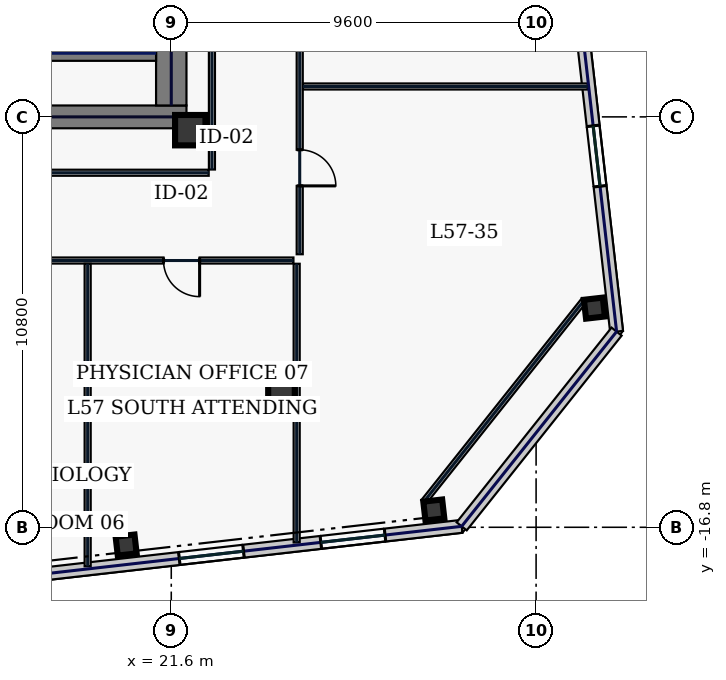
"""IFC4 building model, lengths in metres.
Left out: names, types, materials, properties, quantities, classifications, styles, units other than length and angle.
Written with IfcOpenShell. Run it as: python <this file> out.ifc"""

import sys

from ifc_helpers import new_model, si_unit, direction, frame, frame_2d, origin, origin_2d, place, context, subcontext, project, spatial, rectangle, hollow_rectangle, extrude, element, fill, save


model = new_model("IFC4")
c1 = context("Model", 3, precision=1e-05, world=origin(), true_north=direction((0.0, 1.0)))
c2 = subcontext(c1, "Body", "Model", "MODEL_VIEW")
j1 = project(units=[si_unit("LENGTHUNIT", "METRE"), si_unit("PLANEANGLEUNIT", "RADIAN")], contexts=[c1])
p1 = place(None, origin())
s1 = spatial("IfcSite", under=j1, at=p1, CompositionType="ELEMENT")
p2 = place(p1, origin())
s2 = spatial("IfcBuilding", under=s1, at=p2, CompositionType="ELEMENT")
p3 = place(p2, frame((0.0, 0.0, 247.0)))
s3 = spatial("IfcBuildingStorey", under=s2, at=p3, CompositionType="ELEMENT", Elevation=247.0)
p4 = place(p3, frame((10.5, -6.0, 0.0), z_axis=(0.0, 0.0, 1.0), x_axis=(1.0, 0.0, 0.0)))
e1 = element("IfcWall", 1, at=p4, inside=s3, PredefinedType="SHEAR", context=c2, shape_type="SweptSolid", body=[
    extrude(rectangle(XDim=11.5, YDim=0.6, at=frame_2d((5.75, 0.0))), origin(), (0.0, 0.0, 1.0), 3.74),
])
p5 = place(p3, frame((21.6, -5.7, 0.0), z_axis=(0.0, 0.0, 1.0), x_axis=(0.0, 1.0, 0.0)))
e2 = element("IfcWall", 2, at=p5, inside=s3, PredefinedType="SHEAR", context=c2, shape_type="SweptSolid", body=[
    extrude(rectangle(XDim=11.4, YDim=0.8, at=frame_2d((5.7, 0.0))), origin(), (0.0, 0.0, 1.0), 3.74),
])
p6 = place(p3, frame((17.8, -4.325, 0.0), z_axis=(0.0, 0.0, 1.0), x_axis=(1.0, 0.0, 0.0)))
e3 = element("IfcWall", 3, at=p6, inside=s3, PredefinedType="SHEAR", context=c2, shape_type="SweptSolid", body=[
    extrude(rectangle(XDim=3.4, YDim=0.4, at=frame_2d((1.7, 0.0))), origin(), (0.0, 0.0, 1.0), 3.74),
])
p7 = place(p3, frame((22.1, -6.35, 0.0), z_axis=(0.0, 0.0, 1.0), x_axis=(1.0, 0.0, 0.0)))
e4 = element("IfcColumn", 4, at=p7, inside=s3, PredefinedType="COLUMN", context=c2, shape_type="SweptSolid", body=[
    extrude(hollow_rectangle(XDim=0.8, YDim=0.8, WallThickness=0.036, at=origin_2d()), origin(), (0.0, 0.0, 1.0), 3.74),
])
p8 = place(p3, frame((24.5, -13.2, 0.0), z_axis=(0.0, 0.0, 1.0), x_axis=(1.0, 0.0, 0.0)))
e5 = element("IfcColumn", 5, at=p8, inside=s3, PredefinedType="COLUMN", context=c2, shape_type="SweptSolid", body=[
    extrude(hollow_rectangle(XDim=0.7, YDim=0.7, WallThickness=0.032, at=origin_2d()), origin(), (0.0, 0.0, 1.0), 3.74),
])
for number, where, z_axis, x_axis in (
    (6, (20.412, -17.268, 0.0), (0.0, 0.0, 1.0), (0.994, 0.113, 0.0)),
    (7, (28.509, -16.345, 0.0), (0.0, 0.0, 1.0), (0.994, 0.113, 0.0)),
    (8, (32.734, -11.033, 0.0), (0.0, 0.0, 1.0), (0.994, 0.113, 0.0)),
):
    element("IfcColumn", number, at=place(p3, frame(where, z_axis=z_axis, x_axis=x_axis)), inside=s3, PredefinedType="COLUMN", context=c2, shape_type="SweptSolid", body=[
        extrude(hollow_rectangle(XDim=0.5, YDim=0.5, WallThickness=0.025, at=origin_2d()), origin(), (0.0, 0.0, 1.0), 3.74),
    ])
p9 = place(p3, frame((10.71, -18.886, 0.0), z_axis=(0.0, 0.0, 1.0), x_axis=(0.993572271362, 0.113199565282, 0.0)))
e9 = element("IfcWall", 9, at=p9, inside=s3, PredefinedType="STANDARD", context=c2, shape_type="SweptSolid", body=[
    extrude(rectangle(XDim=18.651, YDim=0.34, at=frame_2d((9.326, 0.0))), origin(), (0.0, 0.0, 1.0), 3.74),
])
p10 = place(p9, frame((3.024, 0.0, 0.88)))
e10 = element("IfcOpeningElement", 10, at=p10, cuts=e9, PredefinedType="OPENING", context=c2, shape_type="SweptSolid", body=[
    extrude(rectangle(XDim=1.7, YDim=1.95, at=frame_2d((0.85, 0.975))), frame((0.0, 0.18, 0.0), z_axis=(0.0, -1.0, 0.0), x_axis=(1.0, 0.0, 0.0)), (0.0, 0.0, 1.0), 0.36),
])
p11 = place(p9, frame((6.773, 0.0, 0.88)))
e11 = element("IfcOpeningElement", 11, at=p11, cuts=e9, PredefinedType="OPENING", context=c2, shape_type="SweptSolid", body=[
    extrude(rectangle(XDim=0.85, YDim=1.85, at=frame_2d((0.425, 0.925))), frame((0.0, 0.18, 0.0), z_axis=(0.0, -1.0, 0.0), x_axis=(1.0, 0.0, 0.0)), (0.0, 0.0, 1.0), 0.36),
])
p12 = place(p9, frame((11.173, 0.0, 0.88)))
e12 = element("IfcOpeningElement", 12, at=p12, cuts=e9, PredefinedType="OPENING", context=c2, shape_type="SweptSolid", body=[
    extrude(rectangle(XDim=1.7, YDim=1.95, at=frame_2d((0.85, 0.975))), frame((0.0, 0.18, 0.0), z_axis=(0.0, -1.0, 0.0), x_axis=(1.0, 0.0, 0.0)), (0.0, 0.0, 1.0), 0.36),
])
p13 = place(p9, frame((14.921, 0.0, 0.88)))
e13 = element("IfcOpeningElement", 13, at=p13, cuts=e9, PredefinedType="OPENING", context=c2, shape_type="SweptSolid", body=[
    extrude(rectangle(XDim=1.7, YDim=1.95, at=frame_2d((0.85, 0.975))), frame((0.0, 0.18, 0.0), z_axis=(0.0, -1.0, 0.0), x_axis=(1.0, 0.0, 0.0)), (0.0, 0.0, 1.0), 0.36),
])
p14 = place(p3, frame((33.318, -11.651, 0.0), z_axis=(0.0, 0.0, 1.0), x_axis=(-0.11320360501, 0.9935718111, 0.0)))
e14 = element("IfcWall", 14, at=p14, inside=s3, PredefinedType="STANDARD", context=c2, shape_type="SweptSolid", body=[
    extrude(rectangle(XDim=37.2, YDim=0.34, at=frame_2d((18.6, 0.0))), origin(), (0.0, 0.0, 1.0), 3.74),
])
p15 = place(p14, frame((3.85, 0.0, 0.58)))
e15 = element("IfcOpeningElement", 15, at=p15, cuts=e14, PredefinedType="OPENING", context=c2, shape_type="SweptSolid", body=[
    extrude(rectangle(XDim=1.6, YDim=2.3, at=frame_2d((0.8, 1.15))), frame((0.0, 0.18, 0.0), z_axis=(0.0, -1.0, 0.0), x_axis=(1.0, 0.0, 0.0)), (0.0, 0.0, 1.0), 0.36),
])
p16 = place(p14, frame((13.15, 0.0, 0.58)))
e16 = element("IfcOpeningElement", 16, at=p16, cuts=e14, PredefinedType="OPENING", context=c2, shape_type="SweptSolid", body=[
    extrude(rectangle(XDim=1.6, YDim=2.3, at=frame_2d((0.8, 1.15))), frame((0.0, 0.18, 0.0), z_axis=(0.0, -1.0, 0.0), x_axis=(1.0, 0.0, 0.0)), (0.0, 0.0, 1.0), 0.36),
])
p17 = place(p14, frame((22.45, 0.0, 0.58)))
e17 = element("IfcOpeningElement", 17, at=p17, cuts=e14, PredefinedType="OPENING", context=c2, shape_type="SweptSolid", body=[
    extrude(rectangle(XDim=1.6, YDim=2.3, at=frame_2d((0.8, 1.15))), frame((0.0, 0.18, 0.0), z_axis=(0.0, -1.0, 0.0), x_axis=(1.0, 0.0, 0.0)), (0.0, 0.0, 1.0), 0.36),
])
p18 = place(p14, frame((31.75, 0.0, 0.58)))
e18 = element("IfcOpeningElement", 18, at=p18, cuts=e14, PredefinedType="OPENING", context=c2, shape_type="SweptSolid", body=[
    extrude(rectangle(XDim=1.6, YDim=2.3, at=frame_2d((0.8, 1.15))), frame((0.0, 0.18, 0.0), z_axis=(0.0, -1.0, 0.0), x_axis=(1.0, 0.0, 0.0)), (0.0, 0.0, 1.0), 0.36),
])
p19 = place(p3, frame((29.242, -16.775, 0.0), z_axis=(0.0, 0.0, 1.0), x_axis=(0.62252823689, 0.78259733853, 0.0)))
e19 = element("IfcWall", 19, at=p19, inside=s3, PredefinedType="STANDARD", context=c2, shape_type="SweptSolid", body=[
    extrude(rectangle(XDim=6.548, YDim=0.34, at=frame_2d((3.274, 0.0))), origin(), (0.0, 0.0, 1.0), 3.74),
])
p20 = place(p3, frame((28.242, -16.134, 0.0), z_axis=(0.0, 0.0, 1.0), x_axis=(0.622521563328, 0.782602647064, 0.0)))
e20 = element("IfcWall", 20, at=p20, inside=s3, PredefinedType="PARTITIONING", context=c2, shape_type="SweptSolid", body=[
    extrude(rectangle(XDim=6.788, YDim=0.16, at=frame_2d((3.394, 0.0))), origin(), (0.0, 0.0, 1.0), 3.74),
])
p21 = place(p3, frame((24.98, 9.665, 0.0), z_axis=(0.0, 0.0, 1.0), x_axis=(0.0, -1.0, 0.0)))
e21 = element("IfcWall", 21, at=p21, inside=s3, PredefinedType="PARTITIONING", context=c2, shape_type="SweptSolid", body=[
    extrude(rectangle(XDim=19.28, YDim=0.16, at=frame_2d((9.64, 0.0))), origin(), (0.0, 0.0, 1.0), 3.74),
])
p22 = place(p21, frame((16.531, 0.0, 0.0)))
e22 = element("IfcOpeningElement", 22, at=p22, cuts=e21, PredefinedType="OPENING", context=c2, shape_type="SweptSolid", body=[
    extrude(rectangle(XDim=0.95, YDim=2.2, at=frame_2d((0.475, 1.1))), frame((0.0, 0.09, 0.0), z_axis=(0.0, -1.0, 0.0), x_axis=(1.0, 0.0, 0.0)), (0.0, 0.0, 1.0), 0.18),
])
p23 = place(p21, frame((11.875, 0.0, 0.0)))
e23 = element("IfcOpeningElement", 23, at=p23, cuts=e21, PredefinedType="OPENING", context=c2, shape_type="SweptSolid", body=[
    extrude(rectangle(XDim=0.95, YDim=2.2, at=frame_2d((0.475, 1.1))), frame((0.0, 0.09, 0.0), z_axis=(0.0, -1.0, 0.0), x_axis=(1.0, 0.0, 0.0)), (0.0, 0.0, 1.0), 0.18),
])
p24 = place(p21, frame((6.675, 0.0, 0.0)))
e24 = element("IfcOpeningElement", 24, at=p24, cuts=e21, PredefinedType="OPENING", context=c2, shape_type="SweptSolid", body=[
    extrude(rectangle(XDim=0.95, YDim=2.2, at=frame_2d((0.475, 1.1))), frame((0.0, 0.09, 0.0), z_axis=(0.0, -1.0, 0.0), x_axis=(1.0, 0.0, 0.0)), (0.0, 0.0, 1.0), 0.18),
])
p25 = place(p21, frame((1.994, 0.0, 0.0)))
e25 = element("IfcOpeningElement", 25, at=p25, cuts=e21, PredefinedType="OPENING", context=c2, shape_type="SweptSolid", body=[
    extrude(rectangle(XDim=0.95, YDim=2.2, at=frame_2d((0.475, 1.1))), frame((0.0, 0.09, 0.0), z_axis=(0.0, -1.0, 0.0), x_axis=(1.0, 0.0, 0.0)), (0.0, 0.0, 1.0), 0.18),
])
p26 = place(p3, frame((24.815, -9.78, 0.0), z_axis=(0.0, 0.0, 1.0), x_axis=(-1.0, 0.0, 0.0)))
e26 = element("IfcWall", 26, at=p26, inside=s3, PredefinedType="PARTITIONING", context=c2, shape_type="SweptSolid", body=[
    extrude(rectangle(XDim=9.75, YDim=0.16, at=frame_2d((4.875, 0.0))), origin(), (0.0, 0.0, 1.0), 3.74),
])
p27 = place(p26, frame((2.469, 0.0, 0.0)))
e27 = element("IfcOpeningElement", 27, at=p27, cuts=e26, PredefinedType="OPENING", context=c2, shape_type="SweptSolid", body=[
    extrude(rectangle(XDim=0.95, YDim=2.2, at=frame_2d((0.475, 1.1))), frame((0.0, 0.09, 0.0), z_axis=(0.0, -1.0, 0.0), x_axis=(1.0, 0.0, 0.0)), (0.0, 0.0, 1.0), 0.18),
])
p28 = place(p3, frame((10.715, -7.47, 0.0), z_axis=(0.0, 0.0, 1.0), x_axis=(1.0, 0.0, 0.0)))
e28 = element("IfcWall", 28, at=p28, inside=s3, PredefinedType="PARTITIONING", context=c2, shape_type="SweptSolid", body=[
    extrude(rectangle(XDim=11.87, YDim=0.16, at=frame_2d((5.935, 0.0))), origin(), (0.0, 0.0, 1.0), 3.74),
])
p29 = place(p3, frame((22.67, -7.385, 0.0), z_axis=(0.0, 0.0, 1.0), x_axis=(0.0, 1.0, 0.0)))
e29 = element("IfcWall", 29, at=p29, inside=s3, PredefinedType="PARTITIONING", context=c2, shape_type="SweptSolid", body=[
    extrude(rectangle(XDim=14.82, YDim=0.16, at=frame_2d((7.41, 0.0))), origin(), (0.0, 0.0, 1.0), 3.74),
])
p30 = place(p3, frame((24.9, -17.199, 0.0), z_axis=(0.0, 0.0, 1.0), x_axis=(0.0, 1.0, 0.0)))
e30 = element("IfcWall", 30, at=p30, inside=s3, PredefinedType="PARTITIONING", context=c2, shape_type="SweptSolid", body=[
    extrude(rectangle(XDim=7.334, YDim=0.16, at=frame_2d((3.667, 0.0))), origin(), (0.0, 0.0, 1.0), 3.74),
])
p31 = place(p3, frame((19.4, -17.826, 0.0), z_axis=(0.0, 0.0, 1.0), x_axis=(0.0, 1.0, 0.0)))
e31 = element("IfcWall", 31, at=p31, inside=s3, PredefinedType="PARTITIONING", context=c2, shape_type="SweptSolid", body=[
    extrude(rectangle(XDim=7.961, YDim=0.16, at=frame_2d((3.98, 0.0))), origin(), (0.0, 0.0, 1.0), 3.74),
])
p32 = place(p3, frame((25.065, -5.2, 0.0), z_axis=(0.0, 0.0, 1.0), x_axis=(1.0, 0.0, 0.0)))
e32 = element("IfcWall", 32, at=p32, inside=s3, PredefinedType="PARTITIONING", context=c2, shape_type="SweptSolid", body=[
    extrude(rectangle(XDim=7.498, YDim=0.16, at=frame_2d((3.749, 0.0))), origin(), (0.0, 0.0, 1.0), 3.74),
])
p33 = place(p12, origin())
e33 = element("IfcWindow", 33, at=p33, inside=s3, PartitioningType="SINGLE_PANEL", PredefinedType="WINDOW", context=c2, shape_type="SweptSolid", body=[
    extrude(rectangle(XDim=1.7, YDim=1.95, at=frame_2d((0.85, 0.975))), frame((0.0, 0.03, 0.0), z_axis=(0.0, -1.0, 0.0), x_axis=(1.0, 0.0, 0.0)), (0.0, 0.0, 1.0), 0.06),
])
fill(e12, e33)
p34 = place(p13, origin())
e34 = element("IfcWindow", 34, at=p34, inside=s3, PartitioningType="SINGLE_PANEL", PredefinedType="WINDOW", context=c2, shape_type="SweptSolid", body=[
    extrude(rectangle(XDim=1.7, YDim=1.95, at=frame_2d((0.85, 0.975))), frame((0.0, 0.03, 0.0), z_axis=(0.0, -1.0, 0.0), x_axis=(1.0, 0.0, 0.0)), (0.0, 0.0, 1.0), 0.06),
])
fill(e13, e34)
p35 = place(p15, origin())
e35 = element("IfcWindow", 35, at=p35, inside=s3, PartitioningType="SINGLE_PANEL", PredefinedType="WINDOW", context=c2, shape_type="SweptSolid", body=[
    extrude(rectangle(XDim=1.6, YDim=2.3, at=frame_2d((0.8, 1.15))), frame((0.0, 0.03, 0.0), z_axis=(0.0, -1.0, 0.0), x_axis=(1.0, 0.0, 0.0)), (0.0, 0.0, 1.0), 0.06),
])
fill(e15, e35)
p36 = place(p27, origin())
e36 = element("IfcDoor", 36, at=p36, inside=s3, OperationType="SINGLE_SWING_LEFT", PredefinedType="DOOR", context=c2, shape_type="SweptSolid", body=[
    extrude(rectangle(XDim=0.95, YDim=2.2, at=frame_2d((0.475, 1.1))), frame((0.0, 0.025, 0.0), z_axis=(0.0, -1.0, 0.0), x_axis=(1.0, 0.0, 0.0)), (0.0, 0.0, 1.0), 0.05),
])
fill(e27, e36)
p37 = place(p22, origin())
e37 = element("IfcDoor", 37, at=p37, inside=s3, OperationType="SINGLE_SWING_RIGHT", PredefinedType="DOOR", context=c2, shape_type="SweptSolid", body=[
    extrude(rectangle(XDim=0.95, YDim=2.2, at=frame_2d((0.475, 1.1))), frame((0.0, 0.025, 0.0), z_axis=(0.0, -1.0, 0.0), x_axis=(1.0, 0.0, 0.0)), (0.0, 0.0, 1.0), 0.05),
])
fill(e22, e37)
save(model, sys.argv[1])
